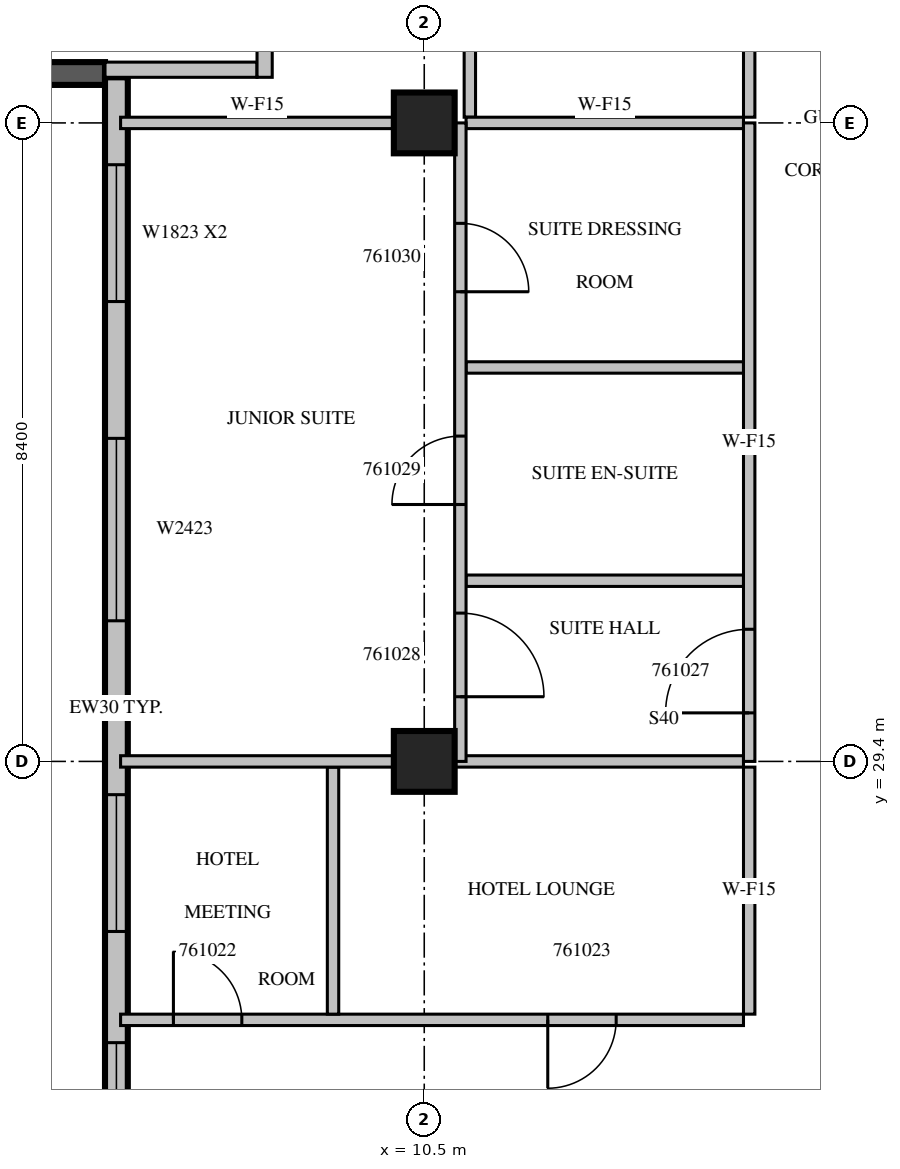
"""IFC4 building model, lengths in metres.
Left out: names, types, materials, properties, quantities, classifications, styles, units other than length and angle.
Written with IfcOpenShell. Run it as: python <this file> out.ifc"""

import sys

from ifc_helpers import new_model, si_unit, direction, frame, frame_2d, origin, origin_2d, place, context, subcontext, project, spatial, rectangle, extrude, source, transform, mapped, element, fill, save


model = new_model("IFC4")
c1 = context("Model", 3, precision=1e-05, world=origin(), true_north=direction((0.0, 1.0)))
c2 = subcontext(c1, "Body", "Model", "MODEL_VIEW")
j1 = project(units=[si_unit("LENGTHUNIT", "METRE"), si_unit("PLANEANGLEUNIT", "RADIAN")], contexts=[c1])
p1 = place(None, origin())
s1 = spatial("IfcSite", under=j1, at=p1, CompositionType="ELEMENT")
p2 = place(p1, origin())
s2 = spatial("IfcBuilding", under=s1, at=p2, CompositionType="ELEMENT")
p3 = place(p2, frame((0.0, 0.0, 265.2)))
s3 = spatial("IfcBuildingStorey", under=s2, at=p3, CompositionType="ELEMENT", Elevation=265.2)
m1 = source(origin(), c2, "Body", "SweptSolid", [
    extrude(rectangle(XDim=0.8, YDim=0.8, at=origin_2d()), origin(), (0.0, 0.0, 1.0), 3.8),
])
for number, where, z_axis, x_axis in (
    (1, (10.5, 29.4, 0.0), (0.0, 0.0, 1.0), (1.0, 0.0, 0.0)),
    (2, (10.5, 37.8, 0.0), (0.0, 0.0, 1.0), (1.0, 0.0, 0.0)),
):
    element("IfcColumn", number, at=place(p3, frame(where, z_axis=z_axis, x_axis=x_axis)), inside=s3, PredefinedType="COLUMN", context=c2, shape_type="MappedRepresentation", body=[
        mapped(m1, transform((0.0, 0.0, 0.0), scale=1.0)),
    ])
m2 = source(origin(), c2, "Body", "SweptSolid", [
    extrude(rectangle(XDim=6.1, YDim=0.3, at=frame_2d((3.05, 0.0))), origin(), (0.0, 0.0, 1.0), 3.4),
])
p4 = place(p3, frame((0.2, 38.45, 0.0), z_axis=(0.0, 0.0, 1.0), x_axis=(1.0, 0.0, 0.0)))
e3 = element("IfcWall", 3, at=p4, inside=s3, PredefinedType="SOLIDWALL", context=c2, shape_type="MappedRepresentation", body=[
    mapped(m2, transform((0.0, 0.0, 0.0), scale=1.0)),
])
m3 = source(origin(), c2, "Body", "SweptSolid", [
    extrude(rectangle(XDim=16.6, YDim=0.3, at=frame_2d((8.3, 0.0))), origin(), (0.0, 0.0, 1.0), 3.4),
])
p5 = place(p3, frame((6.45, 38.4, 0.0), z_axis=(0.0, 0.0, 1.0), x_axis=(0.0, -1.0, 0.0)))
e4 = element("IfcWall", 4, at=p5, inside=s3, PredefinedType="STANDARD", context=c2, shape_type="MappedRepresentation", body=[
    mapped(m3, transform((0.0, 0.0, 0.0), scale=1.0)),
])
m4 = source(origin(), c2, "Body", "SweptSolid", [
    extrude(rectangle(XDim=1.8, YDim=2.3, at=frame_2d((0.9, 1.15))), frame((0.0, 0.16, 0.0), z_axis=(0.0, -1.0, 0.0), x_axis=(1.0, 0.0, 0.0)), (0.0, 0.0, 1.0), 0.32),
])
p6 = place(p5, frame((1.15, 0.0, 0.6)))
e5 = element("IfcOpeningElement", 5, at=p6, cuts=e4, PredefinedType="OPENING", context=c2, shape_type="MappedRepresentation", body=[
    mapped(m4, transform((0.0, 0.0, 0.0), scale=1.0)),
])
m5 = source(origin(), c2, "Body", "SweptSolid", [
    extrude(rectangle(XDim=2.4, YDim=2.3, at=frame_2d((1.2, 1.15))), frame((0.0, 0.16, 0.0), z_axis=(0.0, -1.0, 0.0), x_axis=(1.0, 0.0, 0.0)), (0.0, 0.0, 1.0), 0.32),
])
p7 = place(p5, frame((4.75, 0.0, 0.6)))
e6 = element("IfcOpeningElement", 6, at=p7, cuts=e4, PredefinedType="OPENING", context=c2, shape_type="MappedRepresentation", body=[
    mapped(m5, transform((0.0, 0.0, 0.0), scale=1.0)),
])
p8 = place(p5, frame((9.438, 0.0, 0.6)))
e7 = element("IfcOpeningElement", 7, at=p8, cuts=e4, PredefinedType="OPENING", context=c2, shape_type="MappedRepresentation", body=[
    mapped(m4, transform((0.0, 0.0, 0.0), scale=1.0)),
])
m6 = source(origin(), c2, "Body", "SweptSolid", [
    extrude(rectangle(XDim=3.0, YDim=2.3, at=frame_2d((1.5, 1.15))), frame((0.0, 0.16, 0.0), z_axis=(0.0, -1.0, 0.0), x_axis=(1.0, 0.0, 0.0)), (0.0, 0.0, 1.0), 0.32),
])
p9 = place(p5, frame((12.7, 0.0, 0.6)))
e8 = element("IfcOpeningElement", 8, at=p9, cuts=e4, PredefinedType="OPENING", context=c2, shape_type="MappedRepresentation", body=[
    mapped(m6, transform((0.0, 0.0, 0.0), scale=1.0)),
])
m7 = source(origin(), c2, "Body", "SweptSolid", [
    extrude(rectangle(XDim=2.0, YDim=0.2, at=frame_2d((1.0, 0.0))), origin(), (0.0, 0.0, 1.0), 3.4),
])
p10 = place(p3, frame((6.3, 38.5, 0.0), z_axis=(0.0, 0.0, 1.0), x_axis=(1.0, 0.0, 0.0)))
e9 = element("IfcWall", 9, at=p10, inside=s3, PredefinedType="PARTITIONING", context=c2, shape_type="MappedRepresentation", body=[
    mapped(m7, transform((0.0, 0.0, 0.0), scale=1.0)),
])
m8 = source(origin(), c2, "Body", "SweptSolid", [
    extrude(rectangle(XDim=5.45, YDim=0.2, at=frame_2d((2.725, 0.0))), origin(), (0.0, 0.0, 1.0), 3.4),
])
p11 = place(p3, frame((8.4, 38.4, 0.0), z_axis=(0.0, 0.0, 1.0), x_axis=(0.0, 1.0, 0.0)))
e10 = element("IfcWall", 10, at=p11, inside=s3, PredefinedType="PARTITIONING", context=c2, shape_type="MappedRepresentation", body=[
    mapped(m8, transform((0.0, 0.0, 0.0), scale=1.0)),
])
m9 = source(origin(), c2, "Body", "SweptSolid", [
    extrude(rectangle(XDim=1.2, YDim=2.1, at=frame_2d((0.6, 1.05))), frame((0.0, 0.11, 0.0), z_axis=(0.0, -1.0, 0.0), x_axis=(1.0, 0.0, 0.0)), (0.0, 0.0, 1.0), 0.22),
])
p12 = place(p11, frame((0.4, 0.0, 0.0)))
e11 = element("IfcOpeningElement", 11, at=p12, cuts=e10, PredefinedType="OPENING", context=c2, shape_type="MappedRepresentation", body=[
    mapped(m9, transform((0.0, 0.0, 0.0), scale=1.0)),
])
m10 = source(origin(), c2, "Body", "SweptSolid", [
    extrude(rectangle(XDim=0.9, YDim=2.1, at=frame_2d((0.45, 1.05))), frame((0.0, 0.11, 0.0), z_axis=(0.0, -1.0, 0.0), x_axis=(1.0, 0.0, 0.0)), (0.0, 0.0, 1.0), 0.22),
])
p13 = place(p11, frame((3.25, 0.0, 0.0)))
e12 = element("IfcOpeningElement", 12, at=p13, cuts=e10, PredefinedType="OPENING", context=c2, shape_type="MappedRepresentation", body=[
    mapped(m10, transform((0.0, 0.0, 0.0), scale=1.0)),
])
m11 = source(origin(), c2, "Body", "SweptSolid", [
    extrude(rectangle(XDim=8.195, YDim=0.15, at=frame_2d((4.098, 0.0))), origin(), (0.0, 0.0, 1.0), 3.4),
])
p14 = place(p3, frame((6.505, 26.0, 0.0), z_axis=(0.0, 0.0, 1.0), x_axis=(1.0, 0.0, 0.0)))
e13 = element("IfcWall", 13, at=p14, inside=s3, PredefinedType="PARTITIONING", context=c2, shape_type="MappedRepresentation", body=[
    mapped(m11, transform((0.0, 0.0, 0.0), scale=1.0)),
])
m12 = source(origin(), c2, "Body", "SweptSolid", [
    extrude(rectangle(XDim=0.9, YDim=2.1, at=frame_2d((0.45, 1.05))), frame((0.0, 0.085, 0.0), z_axis=(0.0, -1.0, 0.0), x_axis=(1.0, 0.0, 0.0)), (0.0, 0.0, 1.0), 0.17),
])
p15 = place(p14, frame((0.695, 0.0, 0.0)))
e14 = element("IfcOpeningElement", 14, at=p15, cuts=e13, PredefinedType="OPENING", context=c2, shape_type="MappedRepresentation", body=[
    mapped(m12, transform((0.0, 0.0, 0.0), scale=1.0)),
])
p16 = place(p14, frame((5.62, 0.0, 0.0)))
e15 = element("IfcOpeningElement", 15, at=p16, cuts=e13, PredefinedType="OPENING", context=c2, shape_type="MappedRepresentation", body=[
    mapped(m12, transform((0.0, 0.0, 0.0), scale=1.0)),
])
m13 = source(origin(), c2, "Body", "SweptSolid", [
    extrude(rectangle(XDim=3.25, YDim=0.15, at=frame_2d((1.625, 0.0))), origin(), (0.0, 0.0, 1.0), 3.4),
])
for number, where, z_axis, x_axis in (
    (16, (9.3, 26.075, 0.0), (0.0, 0.0, 1.0), (0.0, 1.0, 0.0)),
    (17, (14.775, 26.075, 0.0), (0.0, 0.0, 1.0), (0.0, 1.0, 0.0)),
):
    element("IfcWall", number, at=place(p3, frame(where, z_axis=z_axis, x_axis=x_axis)), inside=s3, PredefinedType="PARTITIONING", context=c2, shape_type="MappedRepresentation", body=[
        mapped(m13, transform((0.0, 0.0, 0.0), scale=1.0)),
    ])
m14 = source(origin(), c2, "Body", "SweptSolid", [
    extrude(rectangle(XDim=3.596, YDim=0.15, at=frame_2d((1.798, 0.0))), origin(), (0.0, 0.0, 1.0), 3.4),
])
p17 = place(p3, frame((10.101, 29.4, 0.0), z_axis=(0.0, 0.0, 1.0), x_axis=(-1.0, 0.0, 0.0)))
e18 = element("IfcWall", 18, at=p17, inside=s3, PredefinedType="PARTITIONING", context=c2, shape_type="MappedRepresentation", body=[
    mapped(m14, transform((0.0, 0.0, 0.0), scale=1.0)),
])
m15 = source(origin(), c2, "Body", "SweptSolid", [
    extrude(rectangle(XDim=3.801, YDim=0.15, at=frame_2d((1.901, 0.0))), origin(), (0.0, 0.0, 1.0), 3.4),
])
p18 = place(p3, frame((14.7, 29.4, 0.0), z_axis=(0.0, 0.0, 1.0), x_axis=(-1.0, 0.0, 0.0)))
e19 = element("IfcWall", 19, at=p18, inside=s3, PredefinedType="PARTITIONING", context=c2, shape_type="MappedRepresentation", body=[
    mapped(m15, transform((0.0, 0.0, 0.0), scale=1.0)),
])
m16 = source(origin(), c2, "Body", "SweptSolid", [
    extrude(rectangle(XDim=6.45, YDim=0.15, at=frame_2d((3.225, 0.0))), origin(), (0.0, 0.0, 1.0), 3.4),
])
p19 = place(p3, frame((11.1, 44.325, 0.0), z_axis=(0.0, 0.0, 1.0), x_axis=(0.0, -1.0, 0.0)))
e20 = element("IfcWall", 20, at=p19, inside=s3, PredefinedType="PARTITIONING", context=c2, shape_type="MappedRepresentation", body=[
    mapped(m16, transform((0.0, 0.0, 0.0), scale=1.0)),
])
p20 = place(p3, frame((14.775, 37.875, 0.0), z_axis=(0.0, 0.0, 1.0), x_axis=(0.0, 1.0, 0.0)))
e21 = element("IfcWall", 21, at=p20, inside=s3, PredefinedType="PARTITIONING", context=c2, shape_type="MappedRepresentation", body=[
    mapped(m16, transform((0.0, 0.0, 0.0), scale=1.0)),
])
p21 = place(p20, frame((2.737, 0.0, 0.0)))
e22 = element("IfcOpeningElement", 22, at=p21, cuts=e21, PredefinedType="OPENING", context=c2, shape_type="MappedRepresentation", body=[
    mapped(m12, transform((0.0, 0.0, 0.0), scale=1.0)),
])
m17 = source(origin(), c2, "Body", "SweptSolid", [
    extrude(rectangle(XDim=3.65, YDim=0.15, at=frame_2d((1.825, 0.0))), origin(), (0.0, 0.0, 1.0), 3.4),
])
for number, where, z_axis, x_axis in (
    (23, (14.7, 31.777, 0.0), (0.0, 0.0, 1.0), (-1.0, 0.0, 0.0)),
    (24, (14.7, 34.583, 0.0), (0.0, 0.0, 1.0), (-1.0, 0.0, 0.0)),
):
    element("IfcWall", number, at=place(p3, frame(where, z_axis=z_axis, x_axis=x_axis)), inside=s3, PredefinedType="PARTITIONING", context=c2, shape_type="MappedRepresentation", body=[
        mapped(m17, transform((0.0, 0.0, 0.0), scale=1.0)),
    ])
p22 = place(p3, frame((10.101, 37.8, 0.0), z_axis=(0.0, 0.0, 1.0), x_axis=(-1.0, 0.0, 0.0)))
e25 = element("IfcWall", 25, at=p22, inside=s3, PredefinedType="PARTITIONING", context=c2, shape_type="MappedRepresentation", body=[
    mapped(m14, transform((0.0, 0.0, 0.0), scale=1.0)),
])
p23 = place(p3, frame((14.7, 37.8, 0.0), z_axis=(0.0, 0.0, 1.0), x_axis=(-1.0, 0.0, 0.0)))
e26 = element("IfcWall", 26, at=p23, inside=s3, PredefinedType="PARTITIONING", context=c2, shape_type="MappedRepresentation", body=[
    mapped(m17, transform((0.0, 0.0, 0.0), scale=1.0)),
])
m18 = source(origin(), c2, "Body", "SweptSolid", [
    extrude(rectangle(XDim=8.4, YDim=0.15, at=frame_2d((4.2, 0.0))), origin(), (0.0, 0.0, 1.0), 3.4),
])
p24 = place(p3, frame((10.975, 29.4, 0.0), z_axis=(0.0, 0.0, 1.0), x_axis=(0.0, 1.0, 0.0)))
e27 = element("IfcWall", 27, at=p24, inside=s3, PredefinedType="PARTITIONING", context=c2, shape_type="MappedRepresentation", body=[
    mapped(m18, transform((0.0, 0.0, 0.0), scale=1.0)),
])
m19 = source(origin(), c2, "Body", "SweptSolid", [
    extrude(rectangle(XDim=1.1, YDim=2.1, at=frame_2d((0.55, 1.05))), frame((0.0, 0.085, 0.0), z_axis=(0.0, -1.0, 0.0), x_axis=(1.0, 0.0, 0.0)), (0.0, 0.0, 1.0), 0.17),
])
p25 = place(p24, frame((0.851, 0.0, 0.0)))
e28 = element("IfcOpeningElement", 28, at=p25, cuts=e27, PredefinedType="OPENING", context=c2, shape_type="MappedRepresentation", body=[
    mapped(m19, transform((0.0, 0.0, 0.0), scale=1.0)),
])
p26 = place(p24, frame((3.38, 0.0, 0.0)))
e29 = element("IfcOpeningElement", 29, at=p26, cuts=e27, PredefinedType="OPENING", context=c2, shape_type="MappedRepresentation", body=[
    mapped(m12, transform((0.0, 0.0, 0.0), scale=1.0)),
])
p27 = place(p24, frame((6.179, 0.0, 0.0)))
e30 = element("IfcOpeningElement", 30, at=p27, cuts=e27, PredefinedType="OPENING", context=c2, shape_type="MappedRepresentation", body=[
    mapped(m12, transform((0.0, 0.0, 0.0), scale=1.0)),
])
p28 = place(p3, frame((14.775, 29.4, 0.0), z_axis=(0.0, 0.0, 1.0), x_axis=(0.0, 1.0, 0.0)))
e31 = element("IfcWall", 31, at=p28, inside=s3, PredefinedType="PARTITIONING", context=c2, shape_type="MappedRepresentation", body=[
    mapped(m18, transform((0.0, 0.0, 0.0), scale=1.0)),
])
p29 = place(p28, frame((0.638, 0.0, 0.0)))
e32 = element("IfcOpeningElement", 32, at=p29, cuts=e31, PredefinedType="OPENING", context=c2, shape_type="MappedRepresentation", body=[
    mapped(m19, transform((0.0, 0.0, 0.0), scale=1.0)),
])
m20 = source(origin(), c2, "Body", "SweptSolid", [
    extrude(rectangle(XDim=1.8, YDim=2.3, at=frame_2d((0.9, 1.15))), frame((0.0, 0.03, 0.0), z_axis=(0.0, -1.0, 0.0), x_axis=(1.0, 0.0, 0.0)), (0.0, 0.0, 1.0), 0.06),
])
p30 = place(p6, origin())
e33 = element("IfcWindow", 33, at=p30, inside=s3, PartitioningType="SINGLE_PANEL", PredefinedType="WINDOW", context=c2, shape_type="MappedRepresentation", body=[
    mapped(m20, transform((0.0, 0.0, 0.0), scale=1.0)),
])
fill(e5, e33)
m21 = source(origin(), c2, "Body", "SweptSolid", [
    extrude(rectangle(XDim=2.4, YDim=2.3, at=frame_2d((1.2, 1.15))), frame((0.0, 0.03, 0.0), z_axis=(0.0, -1.0, 0.0), x_axis=(1.0, 0.0, 0.0)), (0.0, 0.0, 1.0), 0.06),
])
p31 = place(p7, origin())
e34 = element("IfcWindow", 34, at=p31, inside=s3, PartitioningType="SINGLE_PANEL", PredefinedType="WINDOW", context=c2, shape_type="MappedRepresentation", body=[
    mapped(m21, transform((0.0, 0.0, 0.0), scale=1.0)),
])
fill(e6, e34)
p32 = place(p8, origin())
e35 = element("IfcWindow", 35, at=p32, inside=s3, PartitioningType="SINGLE_PANEL", PredefinedType="WINDOW", context=c2, shape_type="MappedRepresentation", body=[
    mapped(m20, transform((0.0, 0.0, 0.0), scale=1.0)),
])
fill(e7, e35)
m22 = source(origin(), c2, "Body", "SweptSolid", [
    extrude(rectangle(XDim=3.0, YDim=2.3, at=frame_2d((1.5, 1.15))), frame((0.0, 0.03, 0.0), z_axis=(0.0, -1.0, 0.0), x_axis=(1.0, 0.0, 0.0)), (0.0, 0.0, 1.0), 0.06),
])
p33 = place(p9, origin())
e36 = element("IfcWindow", 36, at=p33, inside=s3, PartitioningType="SINGLE_PANEL", PredefinedType="WINDOW", context=c2, shape_type="MappedRepresentation", body=[
    mapped(m22, transform((0.0, 0.0, 0.0), scale=1.0)),
])
fill(e8, e36)
m23 = source(origin(), c2, "Body", "SweptSolid", [
    extrude(rectangle(XDim=0.9, YDim=2.1, at=frame_2d((0.45, 1.05))), frame((0.0, 0.025, 0.0), z_axis=(0.0, -1.0, 0.0), x_axis=(1.0, 0.0, 0.0)), (0.0, 0.0, 1.0), 0.05),
])
p34 = place(p15, origin())
e37 = element("IfcDoor", 37, at=p34, inside=s3, OperationType="SINGLE_SWING_LEFT", PredefinedType="DOOR", context=c2, shape_type="MappedRepresentation", body=[
    mapped(m23, transform((0.0, 0.0, 0.0), scale=1.0)),
])
fill(e14, e37)
p35 = place(p16, origin())
e38 = element("IfcDoor", 38, at=p35, inside=s3, OperationType="SINGLE_SWING_RIGHT", PredefinedType="DOOR", context=c2, shape_type="MappedRepresentation", body=[
    mapped(m23, transform((0.0, 0.0, 0.0), scale=1.0)),
])
fill(e15, e38)
m24 = source(origin(), c2, "Body", "SweptSolid", [
    extrude(rectangle(XDim=1.1, YDim=2.1, at=frame_2d((0.55, 1.05))), frame((0.0, 0.025, 0.0), z_axis=(0.0, -1.0, 0.0), x_axis=(1.0, 0.0, 0.0)), (0.0, 0.0, 1.0), 0.05),
])
p36 = place(p29, origin())
e39 = element("IfcDoor", 39, at=p36, inside=s3, OperationType="SINGLE_SWING_LEFT", PredefinedType="DOOR", context=c2, shape_type="MappedRepresentation", body=[
    mapped(m24, transform((0.0, 0.0, 0.0), scale=1.0)),
])
fill(e32, e39)
p37 = place(p25, origin())
e40 = element("IfcDoor", 40, at=p37, inside=s3, OperationType="SINGLE_SWING_RIGHT", PredefinedType="DOOR", context=c2, shape_type="MappedRepresentation", body=[
    mapped(m24, transform((0.0, 0.0, 0.0), scale=1.0)),
])
fill(e28, e40)
p38 = place(p26, origin())
e41 = element("IfcDoor", 41, at=p38, inside=s3, OperationType="SINGLE_SWING_LEFT", PredefinedType="DOOR", context=c2, shape_type="MappedRepresentation", body=[
    mapped(m23, transform((0.0, 0.0, 0.0), scale=1.0)),
])
fill(e29, e41)
p39 = place(p27, origin())
e42 = element("IfcDoor", 42, at=p39, inside=s3, OperationType="SINGLE_SWING_RIGHT", PredefinedType="DOOR", context=c2, shape_type="MappedRepresentation", body=[
    mapped(m23, transform((0.0, 0.0, 0.0), scale=1.0)),
])
fill(e30, e42)
save(model, sys.argv[1])
